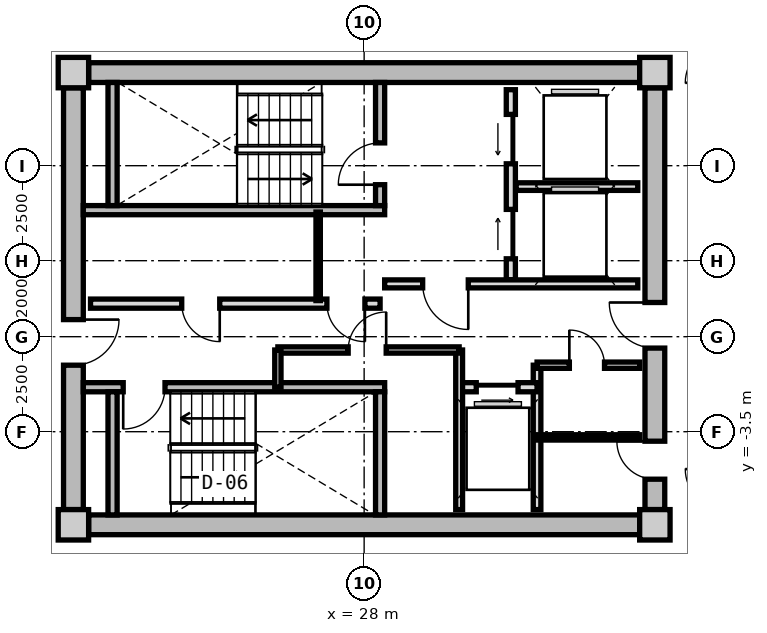
"""IFC4 building model, lengths in metres.
Left out: names, types, materials, properties, quantities, classifications, styles, units other than length and angle.
Written with IfcOpenShell. Run it as: python <this file> out.ifc"""

import sys

from ifc_helpers import new_model, si_unit, direction, frame, frame_2d, origin, origin_2d, place, context, subcontext, project, spatial, rectangle, extrude, source, transform, mapped, element, fill, save


model = new_model("IFC4")
c1 = context("Model", 3, precision=1e-05, world=origin(), true_north=direction((0.0, 1.0)))
c2 = subcontext(c1, "Body", "Model", "MODEL_VIEW")
j1 = project(units=[si_unit("LENGTHUNIT", "METRE"), si_unit("PLANEANGLEUNIT", "RADIAN")], contexts=[c1])
p1 = place(None, origin())
s1 = spatial("IfcSite", under=j1, at=p1, CompositionType="ELEMENT")
p2 = place(p1, origin())
s2 = spatial("IfcBuilding", under=s1, at=p2, CompositionType="ELEMENT")
p3 = place(p2, frame((0.0, 0.0, 210.85)))
s3 = spatial("IfcBuildingStorey", under=s2, at=p3, CompositionType="ELEMENT", Elevation=210.85)
m1 = source(origin(), c2, "Body", "SweptSolid", [
    extrude(rectangle(XDim=0.8, YDim=0.8, at=origin_2d()), origin(), (0.0, 0.0, 1.0), 3.05),
])
for number, where, z_axis, x_axis in (
    (1, (20.35, -5.95, 0.0), (0.0, 0.0, 1.0), (1.0, 0.0, 0.0)),
    (2, (35.65, -5.95, 0.0), (0.0, 0.0, 1.0), (1.0, 0.0, 0.0)),
    (3, (35.65, 5.95, 0.0), (0.0, 0.0, 1.0), (1.0, 0.0, 0.0)),
    (4, (20.35, 5.95, 0.0), (0.0, 0.0, 1.0), (1.0, 0.0, 0.0)),
):
    element("IfcColumn", number, at=place(p3, frame(where, z_axis=z_axis, x_axis=x_axis)), inside=s3, PredefinedType="COLUMN", context=c2, shape_type="MappedRepresentation", body=[
        mapped(m1, transform((0.0, 0.0, 0.0), x_axis=(1.0, 0.0, 0.0), y_axis=(0.0, 1.0, 0.0), z_axis=(0.0, 0.0, 1.0), scale=1.0)),
    ])
m2 = source(origin(), c2, "Body", "SweptSolid", [
    extrude(rectangle(XDim=14.5, YDim=0.52, at=frame_2d((7.25, 0.0))), origin(), (0.0, 0.0, 1.0), 2.76),
])
for number, where, z_axis, x_axis in (
    (5, (20.75, 5.95, 0.0), (0.0, 0.0, 1.0), (1.0, 0.0, 0.0)),
    (6, (35.25, -5.95, 0.0), (0.0, 0.0, 1.0), (-1.0, 0.0, 0.0)),
):
    element("IfcWall", number, at=place(p3, frame(where, z_axis=z_axis, x_axis=x_axis)), inside=s3, PredefinedType="SHEAR", context=c2, shape_type="MappedRepresentation", body=[
        mapped(m2, transform((0.0, 0.0, 0.0), x_axis=(1.0, 0.0, 0.0), y_axis=(0.0, 1.0, 0.0), z_axis=(0.0, 0.0, 1.0), scale=1.0)),
    ])
m3 = source(origin(), c2, "Body", "SweptSolid", [
    extrude(rectangle(XDim=11.1, YDim=0.52, at=frame_2d((5.55, 0.0))), origin(), (0.0, 0.0, 1.0), 2.76),
])
p4 = place(p3, frame((20.35, -5.55, 0.0), z_axis=(0.0, 0.0, 1.0), x_axis=(0.0, 1.0, 0.0)))
e7 = element("IfcWall", 7, at=p4, inside=s3, PredefinedType="SHEAR", context=c2, shape_type="MappedRepresentation", body=[
    mapped(m3, transform((0.0, 0.0, 0.0), x_axis=(1.0, 0.0, 0.0), y_axis=(0.0, 1.0, 0.0), z_axis=(0.0, 0.0, 1.0), scale=1.0)),
])
p5 = place(p4, frame((3.8, 0.0, 0.0)))
e8 = element("IfcOpeningElement", 8, at=p5, cuts=e7, PredefinedType="OPENING", context=c2, shape_type="SweptSolid", body=[
    extrude(rectangle(XDim=1.2, YDim=2.15, at=frame_2d((0.6, 1.075))), frame((0.0, 0.27, 0.0), z_axis=(0.0, -1.0, 0.0), x_axis=(1.0, 0.0, 0.0)), (0.0, 0.0, 1.0), 0.54),
])
p6 = place(p3, frame((35.65, 5.55, 0.0), z_axis=(0.0, 0.0, 1.0), x_axis=(0.0, -1.0, 0.0)))
e9 = element("IfcWall", 9, at=p6, inside=s3, PredefinedType="SHEAR", context=c2, shape_type="MappedRepresentation", body=[
    mapped(m3, transform((0.0, 0.0, 0.0), x_axis=(1.0, 0.0, 0.0), y_axis=(0.0, 1.0, 0.0), z_axis=(0.0, 0.0, 1.0), scale=1.0)),
])
p7 = place(p6, frame((5.65, 0.0, 0.0)))
e10 = element("IfcOpeningElement", 10, at=p7, cuts=e9, PredefinedType="OPENING", context=c2, shape_type="SweptSolid", body=[
    extrude(rectangle(XDim=1.2, YDim=2.15, at=frame_2d((0.6, 1.075))), frame((0.0, 0.27, 0.0), z_axis=(0.0, -1.0, 0.0), x_axis=(1.0, 0.0, 0.0)), (0.0, 0.0, 1.0), 0.54),
])
p8 = place(p6, frame((9.3, 0.0, 0.0)))
e11 = element("IfcOpeningElement", 11, at=p8, cuts=e9, PredefinedType="OPENING", context=c2, shape_type="SweptSolid", body=[
    extrude(rectangle(XDim=1.0, YDim=2.1, at=frame_2d((0.5, 1.05))), frame((0.0, 0.27, 0.0), z_axis=(0.0, -1.0, 0.0), x_axis=(1.0, 0.0, 0.0)), (0.0, 0.0, 1.0), 0.54),
])
m4 = source(origin(), c2, "Body", "SweptSolid", [
    extrude(rectangle(XDim=7.93, YDim=0.24, at=frame_2d((3.965, 0.0))), origin(), (0.0, 0.0, 1.0), 2.76),
])
p9 = place(p3, frame((20.61, 2.33, 0.0), z_axis=(0.0, 0.0, 1.0), x_axis=(1.0, 0.0, 0.0)))
e12 = element("IfcWall", 12, at=p9, inside=s3, PredefinedType="PARTITIONING", context=c2, shape_type="MappedRepresentation", body=[
    mapped(m4, transform((0.0, 0.0, 0.0), x_axis=(1.0, 0.0, 0.0), y_axis=(0.0, 1.0, 0.0), z_axis=(0.0, 0.0, 1.0), scale=1.0)),
])
m5 = source(origin(), c2, "Body", "SweptSolid", [
    extrude(rectangle(XDim=3.24, YDim=0.24, at=frame_2d((1.62, 0.0))), origin(), (0.0, 0.0, 1.0), 2.76),
])
p10 = place(p3, frame((21.38, 2.45, 0.0), z_axis=(0.0, 0.0, 1.0), x_axis=(0.0, 1.0, 0.0)))
e13 = element("IfcWall", 13, at=p10, inside=s3, PredefinedType="PARTITIONING", context=c2, shape_type="MappedRepresentation", body=[
    mapped(m5, transform((0.0, 0.0, 0.0), x_axis=(1.0, 0.0, 0.0), y_axis=(0.0, 1.0, 0.0), z_axis=(0.0, 0.0, 1.0), scale=1.0)),
])
p11 = place(p3, frame((28.42, 2.45, 0.0), z_axis=(0.0, 0.0, 1.0), x_axis=(0.0, 1.0, 0.0)))
e14 = element("IfcWall", 14, at=p11, inside=s3, PredefinedType="PARTITIONING", context=c2, shape_type="MappedRepresentation", body=[
    mapped(m5, transform((0.0, 0.0, 0.0), x_axis=(1.0, 0.0, 0.0), y_axis=(0.0, 1.0, 0.0), z_axis=(0.0, 0.0, 1.0), scale=1.0)),
])
p12 = place(p11, frame((0.55, 0.0, 0.0)))
e15 = element("IfcOpeningElement", 15, at=p12, cuts=e14, PredefinedType="OPENING", context=c2, shape_type="SweptSolid", body=[
    extrude(rectangle(XDim=1.1, YDim=2.15, at=frame_2d((0.55, 1.075))), frame((0.0, 0.13, 0.0), z_axis=(0.0, -1.0, 0.0), x_axis=(1.0, 0.0, 0.0)), (0.0, 0.0, 1.0), 0.26),
])
p13 = place(p3, frame((20.61, -2.33, 0.0), z_axis=(0.0, 0.0, 1.0), x_axis=(1.0, 0.0, 0.0)))
e16 = element("IfcWall", 16, at=p13, inside=s3, PredefinedType="PARTITIONING", context=c2, shape_type="MappedRepresentation", body=[
    mapped(m4, transform((0.0, 0.0, 0.0), x_axis=(1.0, 0.0, 0.0), y_axis=(0.0, 1.0, 0.0), z_axis=(0.0, 0.0, 1.0), scale=1.0)),
])
p14 = place(p13, frame((1.05, 0.0, 0.0)))
e17 = element("IfcOpeningElement", 17, at=p14, cuts=e16, PredefinedType="OPENING", context=c2, shape_type="SweptSolid", body=[
    extrude(rectangle(XDim=1.1, YDim=2.15, at=frame_2d((0.55, 1.075))), frame((0.0, 0.13, 0.0), z_axis=(0.0, -1.0, 0.0), x_axis=(1.0, 0.0, 0.0)), (0.0, 0.0, 1.0), 0.26),
])
for number, where, z_axis, x_axis in (
    (18, (21.38, -5.69, 0.0), (0.0, 0.0, 1.0), (0.0, 1.0, 0.0)),
    (19, (28.42, -5.69, 0.0), (0.0, 0.0, 1.0), (0.0, 1.0, 0.0)),
):
    element("IfcWall", number, at=place(p3, frame(where, z_axis=z_axis, x_axis=x_axis)), inside=s3, PredefinedType="PARTITIONING", context=c2, shape_type="MappedRepresentation", body=[
        mapped(m5, transform((0.0, 0.0, 0.0), x_axis=(1.0, 0.0, 0.0), y_axis=(0.0, 1.0, 0.0), z_axis=(0.0, 0.0, 1.0), scale=1.0)),
    ])
m6 = source(origin(), c2, "Body", "SweptSolid", [
    extrude(rectangle(XDim=5.0, YDim=0.24, at=frame_2d((2.5, 0.0))), origin(), (0.0, 0.0, 1.0), 2.745),
])
p15 = place(p3, frame((31.86, 0.5, 0.0), z_axis=(0.0, 0.0, 1.0), x_axis=(0.0, 1.0, 0.0)))
e20 = element("IfcWall", 20, at=p15, inside=s3, PredefinedType="PARTITIONING", context=c2, shape_type="MappedRepresentation", body=[
    mapped(m6, transform((0.0, 0.0, 0.0), x_axis=(1.0, 0.0, 0.0), y_axis=(0.0, 1.0, 0.0), z_axis=(0.0, 0.0, 1.0), scale=1.0)),
])
p16 = place(p15, frame((3.05, 0.0, 0.0)))
e21 = element("IfcOpeningElement", 21, at=p16, cuts=e20, PredefinedType="OPENING", context=c2, shape_type="SweptSolid", body=[
    extrude(rectangle(XDim=1.3, YDim=2.2, at=frame_2d((0.65, 1.1))), frame((0.0, 0.13, 0.0), z_axis=(0.0, -1.0, 0.0), x_axis=(1.0, 0.0, 0.0)), (0.0, 0.0, 1.0), 0.26),
])
p17 = place(p15, frame((0.55, 0.0, 0.0)))
e22 = element("IfcOpeningElement", 22, at=p17, cuts=e20, PredefinedType="OPENING", context=c2, shape_type="SweptSolid", body=[
    extrude(rectangle(XDim=1.3, YDim=2.2, at=frame_2d((0.65, 1.1))), frame((0.0, 0.13, 0.0), z_axis=(0.0, -1.0, 0.0), x_axis=(1.0, 0.0, 0.0)), (0.0, 0.0, 1.0), 0.26),
])
m7 = source(origin(), c2, "Body", "SweptSolid", [
    extrude(rectangle(XDim=3.2, YDim=0.2, at=frame_2d((1.6, 0.0))), origin(), (0.0, 0.0, 1.0), 2.745),
])
p18 = place(p3, frame((32.0, 2.95, 0.0), z_axis=(0.0, 0.0, 1.0), x_axis=(1.0, 0.0, 0.0)))
e23 = element("IfcWall", 23, at=p18, inside=s3, PredefinedType="PARTITIONING", context=c2, shape_type="MappedRepresentation", body=[
    mapped(m7, transform((0.0, 0.0, 0.0), x_axis=(1.0, 0.0, 0.0), y_axis=(0.0, 1.0, 0.0), z_axis=(0.0, 0.0, 1.0), scale=1.0)),
])
m8 = source(origin(), c2, "Body", "SweptSolid", [
    extrude(rectangle(XDim=6.66, YDim=0.21, at=frame_2d((3.33, 0.0))), origin(), (0.0, 0.0, 1.0), 2.745),
])
p19 = place(p3, frame((28.54, 0.39, 0.0), z_axis=(0.0, 0.0, 1.0), x_axis=(1.0, 0.0, 0.0)))
e24 = element("IfcWall", 24, at=p19, inside=s3, PredefinedType="PARTITIONING", context=c2, shape_type="MappedRepresentation", body=[
    mapped(m8, transform((0.0, 0.0, 0.0), x_axis=(1.0, 0.0, 0.0), y_axis=(0.0, 1.0, 0.0), z_axis=(0.0, 0.0, 1.0), scale=1.0)),
])
p20 = place(p19, frame((1.0, 0.0, 0.0)))
e25 = element("IfcOpeningElement", 25, at=p20, cuts=e24, PredefinedType="OPENING", context=c2, shape_type="SweptSolid", body=[
    extrude(rectangle(XDim=1.2, YDim=2.15, at=frame_2d((0.6, 1.075))), frame((0.0, 0.115, 0.0), z_axis=(0.0, -1.0, 0.0), x_axis=(1.0, 0.0, 0.0)), (0.0, 0.0, 1.0), 0.23),
])
m9 = source(origin(), c2, "Body", "SweptSolid", [
    extrude(rectangle(XDim=7.62, YDim=0.24, at=frame_2d((3.81, 0.0))), origin(), (0.0, 0.0, 1.0), 2.745),
])
p21 = place(p3, frame((20.8, -0.13, 0.0), z_axis=(0.0, 0.0, 1.0), x_axis=(1.0, 0.0, 0.0)))
e26 = element("IfcWall", 26, at=p21, inside=s3, PredefinedType="PARTITIONING", context=c2, shape_type="MappedRepresentation", body=[
    mapped(m9, transform((0.0, 0.0, 0.0), x_axis=(1.0, 0.0, 0.0), y_axis=(0.0, 1.0, 0.0), z_axis=(0.0, 0.0, 1.0), scale=1.0)),
])
p22 = place(p21, frame((6.22, 0.0, 0.0)))
e27 = element("IfcOpeningElement", 27, at=p22, cuts=e26, PredefinedType="OPENING", context=c2, shape_type="SweptSolid", body=[
    extrude(rectangle(XDim=1.0, YDim=2.1, at=frame_2d((0.5, 1.05))), frame((0.0, 0.13, 0.0), z_axis=(0.0, -1.0, 0.0), x_axis=(1.0, 0.0, 0.0)), (0.0, 0.0, 1.0), 0.26),
])
p23 = place(p21, frame((2.4, 0.0, 0.0)))
e28 = element("IfcOpeningElement", 28, at=p23, cuts=e26, PredefinedType="OPENING", context=c2, shape_type="SweptSolid", body=[
    extrude(rectangle(XDim=1.0, YDim=2.1, at=frame_2d((0.5, 1.05))), frame((0.0, 0.13, 0.0), z_axis=(0.0, -1.0, 0.0), x_axis=(1.0, 0.0, 0.0)), (0.0, 0.0, 1.0), 0.26),
])
m10 = source(origin(), c2, "Body", "SweptSolid", [
    extrude(rectangle(XDim=2.33, YDim=0.115, at=frame_2d((1.165, 0.0))), origin(), (0.0, 0.0, 1.0), 2.745),
])
p24 = place(p3, frame((26.79, -0.05, 0.0), z_axis=(0.0, 0.0, 1.0), x_axis=(0.0, 1.0, 0.0)))
e29 = element("IfcWall", 29, at=p24, inside=s3, PredefinedType="PARTITIONING", context=c2, shape_type="MappedRepresentation", body=[
    mapped(m10, transform((0.0, 0.0, 0.0), x_axis=(1.0, 0.0, 0.0), y_axis=(0.0, 1.0, 0.0), z_axis=(0.0, 0.0, 1.0), scale=1.0)),
])
m11 = source(origin(), c2, "Body", "SweptSolid", [
    extrude(rectangle(XDim=3.8, YDim=0.2, at=frame_2d((1.9, 0.0))), origin(), (0.0, 0.0, 1.0), 2.745),
])
p25 = place(p3, frame((32.55, -5.55, 0.0), z_axis=(0.0, 0.0, 1.0), x_axis=(0.0, 1.0, 0.0)))
e30 = element("IfcWall", 30, at=p25, inside=s3, PredefinedType="PARTITIONING", context=c2, shape_type="MappedRepresentation", body=[
    mapped(m11, transform((0.0, 0.0, 0.0), x_axis=(1.0, 0.0, 0.0), y_axis=(0.0, 1.0, 0.0), z_axis=(0.0, 0.0, 1.0), scale=1.0)),
])
m12 = source(origin(), c2, "Body", "SweptSolid", [
    extrude(rectangle(XDim=2.05, YDim=0.24, at=frame_2d((1.025, 0.0))), origin(), (0.0, 0.0, 1.0), 2.745),
])
p26 = place(p3, frame((30.5, -2.33, 0.0), z_axis=(0.0, 0.0, 1.0), x_axis=(1.0, 0.0, 0.0)))
e31 = element("IfcWall", 31, at=p26, inside=s3, PredefinedType="PARTITIONING", context=c2, shape_type="MappedRepresentation", body=[
    mapped(m12, transform((0.0, 0.0, 0.0), x_axis=(1.0, 0.0, 0.0), y_axis=(0.0, 1.0, 0.0), z_axis=(0.0, 0.0, 1.0), scale=1.0)),
])
p27 = place(p26, frame((0.45, 0.0, 0.0)))
e32 = element("IfcOpeningElement", 32, at=p27, cuts=e31, PredefinedType="OPENING", context=c2, shape_type="SweptSolid", body=[
    extrude(rectangle(XDim=1.1, YDim=2.2, at=frame_2d((0.55, 1.1))), frame((0.0, 0.13, 0.0), z_axis=(0.0, -1.0, 0.0), x_axis=(1.0, 0.0, 0.0)), (0.0, 0.0, 1.0), 0.26),
])
m13 = source(origin(), c2, "Body", "SweptSolid", [
    extrude(rectangle(XDim=4.2, YDim=0.18, at=frame_2d((2.1, 0.0))), origin(), (0.0, 0.0, 1.0), 2.745),
])
p28 = place(p3, frame((30.5, -5.55, 0.0), z_axis=(0.0, 0.0, 1.0), x_axis=(0.0, 1.0, 0.0)))
e33 = element("IfcWall", 33, at=p28, inside=s3, PredefinedType="PARTITIONING", context=c2, shape_type="MappedRepresentation", body=[
    mapped(m13, transform((0.0, 0.0, 0.0), x_axis=(1.0, 0.0, 0.0), y_axis=(0.0, 1.0, 0.0), z_axis=(0.0, 0.0, 1.0), scale=1.0)),
])
m14 = source(origin(), c2, "Body", "SweptSolid", [
    extrude(rectangle(XDim=4.77, YDim=0.165, at=frame_2d((2.385, 0.0))), origin(), (0.0, 0.0, 1.0), 2.745),
])
p29 = place(p3, frame((25.73, -1.35, 0.0), z_axis=(0.0, 0.0, 1.0), x_axis=(1.0, 0.0, 0.0)))
e34 = element("IfcWall", 34, at=p29, inside=s3, PredefinedType="PARTITIONING", context=c2, shape_type="MappedRepresentation", body=[
    mapped(m14, transform((0.0, 0.0, 0.0), x_axis=(1.0, 0.0, 0.0), y_axis=(0.0, 1.0, 0.0), z_axis=(0.0, 0.0, 1.0), scale=1.0)),
])
p30 = place(p29, frame((1.85, 0.0, 0.0)))
e35 = element("IfcOpeningElement", 35, at=p30, cuts=e34, PredefinedType="OPENING", context=c2, shape_type="SweptSolid", body=[
    extrude(rectangle(XDim=1.0, YDim=2.1, at=frame_2d((0.5, 1.05))), frame((0.0, 0.093, 0.0), z_axis=(0.0, -1.0, 0.0), x_axis=(1.0, 0.0, 0.0)), (0.0, 0.0, 1.0), 0.185),
])
m15 = source(origin(), c2, "Body", "SweptSolid", [
    extrude(rectangle(XDim=0.98, YDim=0.165, at=frame_2d((0.49, 0.0))), origin(), (0.0, 0.0, 1.0), 2.745),
])
p31 = place(p3, frame((25.73, -2.33, 0.0), z_axis=(0.0, 0.0, 1.0), x_axis=(0.0, 1.0, 0.0)))
e36 = element("IfcWall", 36, at=p31, inside=s3, PredefinedType="PARTITIONING", context=c2, shape_type="MappedRepresentation", body=[
    mapped(m15, transform((0.0, 0.0, 0.0), x_axis=(1.0, 0.0, 0.0), y_axis=(0.0, 1.0, 0.0), z_axis=(0.0, 0.0, 1.0), scale=1.0)),
])
m16 = source(origin(), c2, "Body", "SweptSolid", [
    extrude(rectangle(XDim=2.7, YDim=0.165, at=frame_2d((1.35, 0.0))), origin(), (0.0, 0.0, 1.0), 2.745),
])
p32 = place(p3, frame((32.55, -1.75, 0.0), z_axis=(0.0, 0.0, 1.0), x_axis=(1.0, 0.0, 0.0)))
e37 = element("IfcWall", 37, at=p32, inside=s3, PredefinedType="PARTITIONING", context=c2, shape_type="MappedRepresentation", body=[
    mapped(m16, transform((0.0, 0.0, 0.0), x_axis=(1.0, 0.0, 0.0), y_axis=(0.0, 1.0, 0.0), z_axis=(0.0, 0.0, 1.0), scale=1.0)),
])
p33 = place(p32, frame((0.85, 0.0, 0.0)))
e38 = element("IfcOpeningElement", 38, at=p33, cuts=e37, PredefinedType="OPENING", context=c2, shape_type="SweptSolid", body=[
    extrude(rectangle(XDim=0.925, YDim=2.1, at=frame_2d((0.462, 1.05))), frame((0.0, 0.093, 0.0), z_axis=(0.0, -1.0, 0.0), x_axis=(1.0, 0.0, 0.0)), (0.0, 0.0, 1.0), 0.185),
])
m17 = source(origin(), c2, "Body", "SweptSolid", [
    extrude(rectangle(XDim=2.7, YDim=0.14, at=frame_2d((1.35, 0.0))), origin(), (0.0, 0.0, 1.0), 2.745),
])
p34 = place(p3, frame((32.55, -3.65, 0.0), z_axis=(0.0, 0.0, 1.0), x_axis=(1.0, 0.0, 0.0)))
e39 = element("IfcWall", 39, at=p34, inside=s3, PredefinedType="PARTITIONING", context=c2, shape_type="MappedRepresentation", body=[
    mapped(m17, transform((0.0, 0.0, 0.0), x_axis=(1.0, 0.0, 0.0), y_axis=(0.0, 1.0, 0.0), z_axis=(0.0, 0.0, 1.0), scale=1.0)),
])
m18 = source(origin(), c2, "Body", "SweptSolid", [
    extrude(rectangle(XDim=1.1, YDim=2.15, at=frame_2d((0.55, 1.075))), frame((0.0, 0.025, 0.0), z_axis=(0.0, -1.0, 0.0), x_axis=(1.0, 0.0, 0.0)), (0.0, 0.0, 1.0), 0.05),
])
p35 = place(p12, origin())
e40 = element("IfcDoor", 40, at=p35, inside=s3, OperationType="SINGLE_SWING_LEFT", PredefinedType="DOOR", context=c2, shape_type="MappedRepresentation", body=[
    mapped(m18, transform((0.0, 0.0, 0.0), x_axis=(1.0, 0.0, 0.0), y_axis=(0.0, 1.0, 0.0), z_axis=(0.0, 0.0, 1.0), scale=1.0)),
])
fill(e15, e40)
p36 = place(p14, frame((1.1, 0.0, 0.0), z_axis=(0.0, 0.0, 1.0), x_axis=(-1.0, 0.0, 0.0)))
e41 = element("IfcDoor", 41, at=p36, inside=s3, OperationType="SINGLE_SWING_RIGHT", PredefinedType="DOOR", context=c2, shape_type="MappedRepresentation", body=[
    mapped(m18, transform((0.0, 0.0, 0.0), x_axis=(1.0, 0.0, 0.0), y_axis=(0.0, 1.0, 0.0), z_axis=(0.0, 0.0, 1.0), scale=1.0)),
])
fill(e17, e41)
m19 = source(origin(), c2, "Body", "SweptSolid", [
    extrude(rectangle(XDim=1.3, YDim=2.2, at=frame_2d((0.65, 1.1))), frame((0.0, 0.025, 0.0), z_axis=(0.0, -1.0, 0.0), x_axis=(1.0, 0.0, 0.0)), (0.0, 0.0, 1.0), 0.05),
])
p37 = place(p16, origin())
e42 = element("IfcDoor", 42, at=p37, inside=s3, OperationType="SLIDING_TO_LEFT", PredefinedType="DOOR", context=c2, shape_type="MappedRepresentation", body=[
    mapped(m19, transform((0.0, 0.0, 0.0), x_axis=(1.0, 0.0, 0.0), y_axis=(0.0, 1.0, 0.0), z_axis=(0.0, 0.0, 1.0), scale=1.0)),
])
fill(e21, e42)
p38 = place(p17, origin())
e43 = element("IfcDoor", 43, at=p38, inside=s3, OperationType="SLIDING_TO_RIGHT", PredefinedType="DOOR", context=c2, shape_type="MappedRepresentation", body=[
    mapped(m19, transform((0.0, 0.0, 0.0), x_axis=(1.0, 0.0, 0.0), y_axis=(0.0, 1.0, 0.0), z_axis=(0.0, 0.0, 1.0), scale=1.0)),
])
fill(e22, e43)
m20 = source(origin(), c2, "Body", "SweptSolid", [
    extrude(rectangle(XDim=1.2, YDim=2.15, at=frame_2d((0.6, 1.075))), frame((0.0, 0.025, 0.0), z_axis=(0.0, -1.0, 0.0), x_axis=(1.0, 0.0, 0.0)), (0.0, 0.0, 1.0), 0.05),
])
p39 = place(p20, frame((1.2, 0.0, 0.0), z_axis=(0.0, 0.0, 1.0), x_axis=(-1.0, 0.0, 0.0)))
e44 = element("IfcDoor", 44, at=p39, inside=s3, OperationType="SINGLE_SWING_LEFT", PredefinedType="DOOR", context=c2, shape_type="MappedRepresentation", body=[
    mapped(m20, transform((0.0, 0.0, 0.0), x_axis=(1.0, 0.0, 0.0), y_axis=(0.0, 1.0, 0.0), z_axis=(0.0, 0.0, 1.0), scale=1.0)),
])
fill(e25, e44)
p40 = place(p5, frame((1.2, 0.0, 0.0), z_axis=(0.0, 0.0, 1.0), x_axis=(-1.0, 0.0, 0.0)))
e45 = element("IfcDoor", 45, at=p40, inside=s3, OperationType="SINGLE_SWING_LEFT", PredefinedType="DOOR", context=c2, shape_type="MappedRepresentation", body=[
    mapped(m20, transform((0.0, 0.0, 0.0), x_axis=(1.0, 0.0, 0.0), y_axis=(0.0, 1.0, 0.0), z_axis=(0.0, 0.0, 1.0), scale=1.0)),
])
fill(e8, e45)
p41 = place(p7, frame((1.2, 0.0, 0.0), z_axis=(0.0, 0.0, 1.0), x_axis=(-1.0, 0.0, 0.0)))
e46 = element("IfcDoor", 46, at=p41, inside=s3, OperationType="SINGLE_SWING_RIGHT", PredefinedType="DOOR", context=c2, shape_type="MappedRepresentation", body=[
    mapped(m20, transform((0.0, 0.0, 0.0), x_axis=(1.0, 0.0, 0.0), y_axis=(0.0, 1.0, 0.0), z_axis=(0.0, 0.0, 1.0), scale=1.0)),
])
fill(e10, e46)
m21 = source(origin(), c2, "Body", "SweptSolid", [
    extrude(rectangle(XDim=1.0, YDim=2.1, at=frame_2d((0.5, 1.05))), frame((0.0, 0.025, 0.0), z_axis=(0.0, -1.0, 0.0), x_axis=(1.0, 0.0, 0.0)), (0.0, 0.0, 1.0), 0.05),
])
p42 = place(p22, frame((1.0, 0.0, 0.0), z_axis=(0.0, 0.0, 1.0), x_axis=(-1.0, 0.0, 0.0)))
e47 = element("IfcDoor", 47, at=p42, inside=s3, OperationType="SINGLE_SWING_LEFT", PredefinedType="DOOR", context=c2, shape_type="MappedRepresentation", body=[
    mapped(m21, transform((0.0, 0.0, 0.0), x_axis=(1.0, 0.0, 0.0), y_axis=(0.0, 1.0, 0.0), z_axis=(0.0, 0.0, 1.0), scale=1.0)),
])
fill(e27, e47)
p43 = place(p23, frame((1.0, 0.0, 0.0), z_axis=(0.0, 0.0, 1.0), x_axis=(-1.0, 0.0, 0.0)))
e48 = element("IfcDoor", 48, at=p43, inside=s3, OperationType="SINGLE_SWING_LEFT", PredefinedType="DOOR", context=c2, shape_type="MappedRepresentation", body=[
    mapped(m21, transform((0.0, 0.0, 0.0), x_axis=(1.0, 0.0, 0.0), y_axis=(0.0, 1.0, 0.0), z_axis=(0.0, 0.0, 1.0), scale=1.0)),
])
fill(e28, e48)
m22 = source(origin(), c2, "Body", "SweptSolid", [
    extrude(rectangle(XDim=1.1, YDim=2.2, at=frame_2d((0.55, 1.1))), frame((0.0, 0.025, 0.0), z_axis=(0.0, -1.0, 0.0), x_axis=(1.0, 0.0, 0.0)), (0.0, 0.0, 1.0), 0.05),
])
p44 = place(p27, frame((1.1, 0.0, 0.0), z_axis=(0.0, 0.0, 1.0), x_axis=(-1.0, 0.0, 0.0)))
e49 = element("IfcDoor", 49, at=p44, inside=s3, OperationType="SLIDING_TO_RIGHT", PredefinedType="DOOR", context=c2, shape_type="MappedRepresentation", body=[
    mapped(m22, transform((0.0, 0.0, 0.0), x_axis=(1.0, 0.0, 0.0), y_axis=(0.0, 1.0, 0.0), z_axis=(0.0, 0.0, 1.0), scale=1.0)),
])
fill(e32, e49)
p45 = place(p30, origin())
e50 = element("IfcDoor", 50, at=p45, inside=s3, OperationType="SINGLE_SWING_RIGHT", PredefinedType="DOOR", context=c2, shape_type="MappedRepresentation", body=[
    mapped(m21, transform((0.0, 0.0, 0.0), x_axis=(1.0, 0.0, 0.0), y_axis=(0.0, 1.0, 0.0), z_axis=(0.0, 0.0, 1.0), scale=1.0)),
])
fill(e35, e50)
m23 = source(origin(), c2, "Body", "SweptSolid", [
    extrude(rectangle(XDim=0.925, YDim=2.1, at=frame_2d((0.462, 1.05))), frame((0.0, 0.025, 0.0), z_axis=(0.0, -1.0, 0.0), x_axis=(1.0, 0.0, 0.0)), (0.0, 0.0, 1.0), 0.05),
])
p46 = place(p33, origin())
e51 = element("IfcDoor", 51, at=p46, inside=s3, OperationType="SINGLE_SWING_LEFT", PredefinedType="DOOR", context=c2, shape_type="MappedRepresentation", body=[
    mapped(m23, transform((0.0, 0.0, 0.0), x_axis=(1.0, 0.0, 0.0), y_axis=(0.0, 1.0, 0.0), z_axis=(0.0, 0.0, 1.0), scale=1.0)),
])
fill(e38, e51)
p47 = place(p8, frame((1.0, 0.0, 0.0), z_axis=(0.0, 0.0, 1.0), x_axis=(-1.0, 0.0, 0.0)))
e52 = element("IfcDoor", 52, at=p47, inside=s3, OperationType="SINGLE_SWING_RIGHT", PredefinedType="DOOR", context=c2, shape_type="MappedRepresentation", body=[
    mapped(m21, transform((0.0, 0.0, 0.0), x_axis=(1.0, 0.0, 0.0), y_axis=(0.0, 1.0, 0.0), z_axis=(0.0, 0.0, 1.0), scale=1.0)),
])
fill(e11, e52)
save(model, sys.argv[1])
